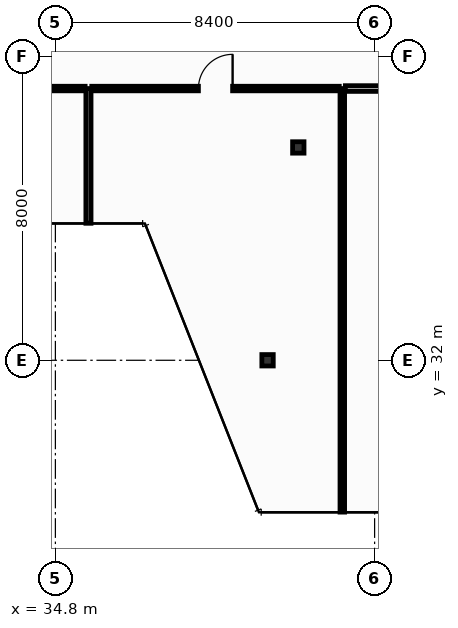
"""IFC4 building model, lengths in metres.
Left out: names, types, materials, properties, quantities, classifications, styles, units other than length and angle.
Written with IfcOpenShell. Run it as: python <this file> out.ifc"""

import sys

from ifc_helpers import new_model, si_unit, direction, frame, frame_2d, origin, origin_2d, place, context, subcontext, project, spatial, rectangle, hollow_rectangle, extrude, element, fill, save


model = new_model("IFC4")
c1 = context("Model", 3, precision=1e-05, world=origin(), true_north=direction((0.0, 1.0)))
c2 = subcontext(c1, "Body", "Model", "MODEL_VIEW")
j1 = project(units=[si_unit("LENGTHUNIT", "METRE"), si_unit("PLANEANGLEUNIT", "RADIAN")], contexts=[c1])
p1 = place(None, origin())
s1 = spatial("IfcSite", under=j1, at=p1, CompositionType="ELEMENT")
p2 = place(p1, origin())
s2 = spatial("IfcBuilding", under=s1, at=p2, CompositionType="ELEMENT")
p3 = place(p2, frame((0.0, 0.0, 283.8)))
s3 = spatial("IfcBuildingStorey", under=s2, at=p3, CompositionType="ELEMENT", Elevation=283.8)
for number, where, z_axis, x_axis in (
    (1, (40.383, 32.0, 0.0), (0.0, 0.0, 1.0), (1.0, 0.0, 0.0)),
    (2, (41.192, 37.6, 0.0), (0.0, 0.0, 1.0), (1.0, 0.0, 0.0)),
):
    element("IfcColumn", number, at=place(p3, frame(where, z_axis=z_axis, x_axis=x_axis)), inside=s3, PredefinedType="COLUMN", context=c2, shape_type="SweptSolid", body=[
        extrude(hollow_rectangle(XDim=0.3, YDim=0.3, WallThickness=0.012, at=origin_2d()), origin(), (0.0, 0.0, 1.0), 3.8),
    ])
p4 = place(p3, frame((35.67, 35.605, 0.0), z_axis=(0.0, 0.0, 1.0), x_axis=(0.0, 1.0, 0.0)))
e3 = element("IfcWall", 3, at=p4, inside=s3, PredefinedType="PARTITIONING", context=c2, shape_type="SweptSolid", body=[
    extrude(rectangle(XDim=3.545, YDim=0.135, at=frame_2d((1.772, 0.0))), origin(), (0.0, 0.0, 1.0), 3.55),
])
p5 = place(p3, frame((42.35, 28.005, 0.0), z_axis=(0.0, 0.0, 1.0), x_axis=(0.0, 1.0, 0.0)))
e4 = element("IfcWall", 4, at=p5, inside=s3, PredefinedType="PARTITIONING", context=c2, shape_type="SweptSolid", body=[
    extrude(rectangle(XDim=11.145, YDim=0.12, at=frame_2d((5.573, 0.0))), origin(), (0.0, 0.0, 1.0), 3.047),
])
p6 = place(p3, frame((29.08, 39.15, 0.0), z_axis=(0.0, 0.0, 1.0), x_axis=(1.0, 0.0, 0.0)))
e5 = element("IfcWall", 5, at=p6, inside=s3, PredefinedType="PARTITIONING", context=c2, shape_type="SweptSolid", body=[
    extrude(rectangle(XDim=6.502, YDim=0.12, at=frame_2d((3.251, 0.0))), origin(), (0.0, 0.0, 1.0), 3.55),
])
p7 = place(p6, frame((2.801, 0.0, 0.0)))
e6 = element("IfcOpeningElement", 6, at=p7, cuts=e5, PredefinedType="OPENING", context=c2, shape_type="SweptSolid", body=[
    extrude(rectangle(XDim=0.9, YDim=2.1, at=frame_2d((0.45, 1.05))), frame((0.0, 0.07, 0.0), z_axis=(0.0, -1.0, 0.0), x_axis=(1.0, 0.0, 0.0)), (0.0, 0.0, 1.0), 0.14),
])
p8 = place(p3, frame((35.758, 39.15, 0.0), z_axis=(0.0, 0.0, 1.0), x_axis=(1.0, 0.0, 0.0)))
e7 = element("IfcWall", 7, at=p8, inside=s3, PredefinedType="PARTITIONING", context=c2, shape_type="SweptSolid", body=[
    extrude(rectangle(XDim=6.512, YDim=0.12, at=frame_2d((3.256, 0.0))), origin(), (0.0, 0.0, 1.0), 3.047),
])
p9 = place(p8, frame((2.806, 0.0, 0.0)))
e8 = element("IfcOpeningElement", 8, at=p9, cuts=e7, PredefinedType="OPENING", context=c2, shape_type="SweptSolid", body=[
    extrude(rectangle(XDim=0.9, YDim=2.1, at=frame_2d((0.45, 1.05))), frame((0.0, 0.07, 0.0), z_axis=(0.0, -1.0, 0.0), x_axis=(1.0, 0.0, 0.0)), (0.0, 0.0, 1.0), 0.14),
])
p10 = place(p3, frame((42.43, 39.15, 0.0), z_axis=(0.0, 0.0, 1.0), x_axis=(1.0, 0.0, 0.0)))
e9 = element("IfcWall", 9, at=p10, inside=s3, PredefinedType="PARTITIONING", context=c2, shape_type="SweptSolid", body=[
    extrude(rectangle(XDim=3.843, YDim=0.15, at=frame_2d((1.921, 0.0))), origin(), (0.0, 0.0, 1.0), 3.55),
])
p11 = place(p10, frame((1.396, 0.0, 0.0)))
e10 = element("IfcOpeningElement", 10, at=p11, cuts=e9, PredefinedType="OPENING", context=c2, shape_type="SweptSolid", body=[
    extrude(rectangle(XDim=1.05, YDim=2.15, at=frame_2d((0.525, 1.075))), frame((0.0, 0.085, 0.0), z_axis=(0.0, -1.0, 0.0), x_axis=(1.0, 0.0, 0.0)), (0.0, 0.0, 1.0), 0.17),
])
p12 = place(p9, origin())
e11 = element("IfcDoor", 11, at=p12, inside=s3, OperationType="SINGLE_SWING_RIGHT", PredefinedType="DOOR", context=c2, shape_type="SweptSolid", body=[
    extrude(rectangle(XDim=0.9, YDim=2.1, at=frame_2d((0.45, 1.05))), frame((0.0, 0.025, 0.0), z_axis=(0.0, -1.0, 0.0), x_axis=(1.0, 0.0, 0.0)), (0.0, 0.0, 1.0), 0.05),
])
fill(e8, e11)
save(model, sys.argv[1])
